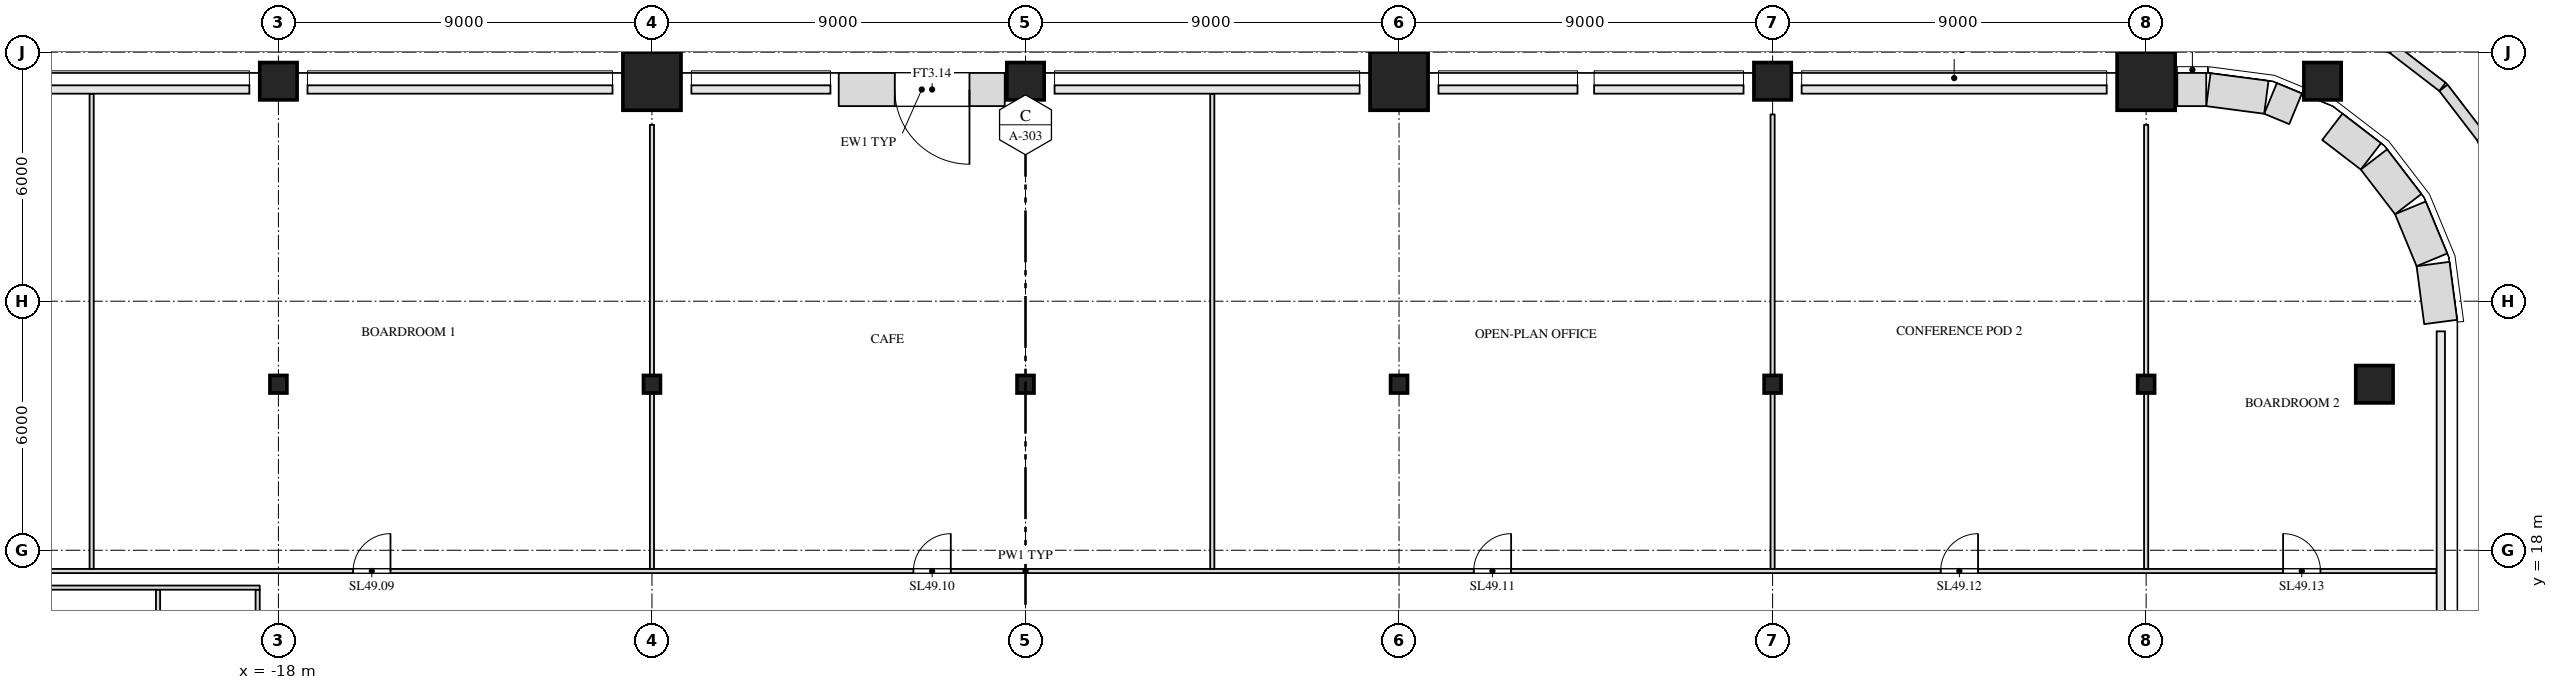
"""IFC4 building model, lengths in metres.
Left out: names, types, materials, properties, quantities, classifications, styles, units other than length and angle.
Written with IfcOpenShell. Run it as: python <this file> out.ifc"""

import sys

from ifc_helpers import new_model, si_unit, direction, frame, frame_2d, origin, origin_2d, place, context, subcontext, project, spatial, rectangle, i_section, extrude, clip, halfspace, element, fill, save


model = new_model("IFC4")
c1 = context("Model", 3, precision=1e-05, world=origin(), true_north=direction((0.0, 1.0)))
c2 = subcontext(c1, "Body", "Model", "MODEL_VIEW")
j1 = project(units=[si_unit("LENGTHUNIT", "METRE"), si_unit("PLANEANGLEUNIT", "RADIAN")], contexts=[c1])
p1 = place(None, origin())
s1 = spatial("IfcSite", under=j1, at=p1, CompositionType="ELEMENT")
p2 = place(p1, origin())
s2 = spatial("IfcBuilding", under=s1, at=p2, CompositionType="ELEMENT")
p3 = place(p2, frame((0.0, 0.0, 212.5)))
s3 = spatial("IfcBuildingStorey", under=s2, at=p3, CompositionType="ELEMENT", Elevation=212.5)
for number, where, z_axis, x_axis in (
    (1, (-18.0, 22.0, 0.0), (0.0, 0.0, 1.0), (1.0, 0.0, 0.0)),
    (2, (-9.0, 22.0, 0.0), (0.0, 0.0, 1.0), (1.0, 0.0, 0.0)),
    (3, (0.0, 22.0, 0.0), (0.0, 0.0, 1.0), (1.0, 0.0, 0.0)),
    (4, (9.0, 22.0, 0.0), (0.0, 0.0, 1.0), (1.0, 0.0, 0.0)),
    (5, (18.0, 22.0, 0.0), (0.0, 0.0, 1.0), (1.0, 0.0, 0.0)),
    (6, (27.0, 22.0, 0.0), (0.0, 0.0, 1.0), (1.0, 0.0, 0.0)),
):
    element("IfcColumn", number, at=place(p3, frame(where, z_axis=z_axis, x_axis=x_axis)), inside=s3, PredefinedType="COLUMN", context=c2, shape_type="SweptSolid", body=[
        extrude(i_section(OverallWidth=0.409, OverallDepth=0.424, WebThickness=0.033, FlangeThickness=0.052, at=origin_2d()), origin(), (0.0, 0.0, 1.0), 4.0),
    ])
p4 = place(p3, frame((32.5, 22.0, 0.0), z_axis=(0.0, 0.0, 1.0), x_axis=(1.0, 0.0, 0.0)))
e7 = element("IfcColumn", 7, at=p4, inside=s3, PredefinedType="COLUMN", context=c2, shape_type="SweptSolid", body=[
    extrude(rectangle(XDim=0.9, YDim=0.9, at=origin_2d()), origin(), (0.0, 0.0, 1.0), 4.0),
])
p5 = place(p3, frame((-18.0, 29.0, 0.0), z_axis=(0.0, 0.242535625036, 0.970142500145), x_axis=(-1.0, 0.0, 0.0)))
e8 = element("IfcColumn", 8, at=p5, inside=s3, PredefinedType="COLUMN", context=c2, shape_type="Clipping", body=[
    clip(extrude(rectangle(XDim=0.9, YDim=0.9, at=origin_2d()), origin(), (0.0, 0.0, 1.0), 4.123), halfspace(frame((0.0, 0.0, 0.113)), True)),
])
p6 = place(p3, frame((-9.0, 29.0, 0.0), z_axis=(0.0, 0.242535625036, 0.970142500145), x_axis=(-1.0, 0.0, 0.0)))
e9 = element("IfcColumn", 9, at=p6, inside=s3, PredefinedType="COLUMN", context=c2, shape_type="Clipping", body=[
    clip(extrude(rectangle(XDim=1.4, YDim=1.4, at=origin_2d()), origin(), (0.0, 0.0, 1.0), 4.123), halfspace(frame((0.0, 0.0, 0.175)), True)),
])
p7 = place(p3, frame((0.0, 29.0, 0.0), z_axis=(0.0, 0.242535625036, 0.970142500145), x_axis=(-1.0, 0.0, 0.0)))
e10 = element("IfcColumn", 10, at=p7, inside=s3, PredefinedType="COLUMN", context=c2, shape_type="Clipping", body=[
    clip(extrude(rectangle(XDim=0.9, YDim=0.9, at=origin_2d()), origin(), (0.0, 0.0, 1.0), 4.123), halfspace(frame((0.0, 0.0, 0.113)), True)),
])
p8 = place(p3, frame((9.0, 29.0, 0.0), z_axis=(0.0, 0.242535625036, 0.970142500145), x_axis=(-1.0, 0.0, 0.0)))
e11 = element("IfcColumn", 11, at=p8, inside=s3, PredefinedType="COLUMN", context=c2, shape_type="Clipping", body=[
    clip(extrude(rectangle(XDim=1.4, YDim=1.4, at=origin_2d()), origin(), (0.0, 0.0, 1.0), 4.123), halfspace(frame((0.0, 0.0, 0.175)), True)),
])
p9 = place(p3, frame((18.0, 29.0, 0.0), z_axis=(0.0, 0.242535625036, 0.970142500145), x_axis=(-1.0, 0.0, 0.0)))
e12 = element("IfcColumn", 12, at=p9, inside=s3, PredefinedType="COLUMN", context=c2, shape_type="Clipping", body=[
    clip(extrude(rectangle(XDim=0.9, YDim=0.9, at=origin_2d()), origin(), (0.0, 0.0, 1.0), 4.123), halfspace(frame((0.0, 0.0, 0.113)), True)),
])
p10 = place(p3, frame((27.0, 29.0, 0.0), z_axis=(0.0, 0.242535625036, 0.970142500145), x_axis=(-1.0, 0.0, 0.0)))
e13 = element("IfcColumn", 13, at=p10, inside=s3, PredefinedType="COLUMN", context=c2, shape_type="Clipping", body=[
    clip(extrude(rectangle(XDim=1.4, YDim=1.4, at=origin_2d()), origin(), (0.0, 0.0, 1.0), 4.123), halfspace(frame((0.0, 0.0, 0.175)), True)),
])
p11 = place(p3, frame((31.25, 29.0, 0.0), z_axis=(0.0, 0.242535625036, 0.970142500145), x_axis=(-1.0, 0.0, 0.0)))
e14 = element("IfcColumn", 14, at=p11, inside=s3, PredefinedType="COLUMN", context=c2, shape_type="Clipping", body=[
    clip(extrude(rectangle(XDim=0.9, YDim=0.9, at=origin_2d()), origin(), (0.0, 0.0, 1.0), 4.123), halfspace(frame((0.0, 0.0, 0.113)), True)),
])
p12 = place(p3, frame((-18.5, 10.55, 0.0), z_axis=(0.0, 0.0, 1.0), x_axis=(0.0, 1.0, 0.0)))
e15 = element("IfcWall", 15, at=p12, inside=s3, PredefinedType="PARTITIONING", context=c2, shape_type="SweptSolid", body=[
    extrude(rectangle(XDim=6.5, YDim=0.1, at=frame_2d((3.25, 0.0))), origin(), (0.0, 0.0, 1.0), 3.65),
])
p13 = place(p3, frame((-20.9, 12.95, 0.0), z_axis=(0.0, 0.0, 1.0), x_axis=(0.0, 1.0, 0.0)))
e16 = element("IfcWall", 16, at=p13, inside=s3, PredefinedType="PARTITIONING", context=c2, shape_type="SweptSolid", body=[
    extrude(rectangle(XDim=4.1, YDim=0.1, at=frame_2d((2.05, 0.0))), origin(), (0.0, 0.0, 1.0), 3.65),
])
p14 = place(p3, frame((-26.55, 17.1, 0.0), z_axis=(0.0, 0.0, 1.0), x_axis=(1.0, 0.0, 0.0)))
e17 = element("IfcWall", 17, at=p14, inside=s3, PredefinedType="PARTITIONING", context=c2, shape_type="SweptSolid", body=[
    extrude(rectangle(XDim=8.1, YDim=0.1, at=frame_2d((4.05, 0.0))), origin(), (0.0, 0.0, 1.0), 3.65),
])
p15 = place(p3, frame((-33.996, 17.5, 0.0), z_axis=(0.0, 0.0, 1.0), x_axis=(1.0, 0.0, 0.0)))
e18 = element("IfcWall", 18, at=p15, inside=s3, PredefinedType="PARTITIONING", context=c2, shape_type="SweptSolid", body=[
    extrude(rectangle(XDim=67.992, YDim=0.1, at=frame_2d((33.996, 0.0))), origin(), (0.0, 0.0, 1.0), 3.65),
])
p16 = place(p15, frame((5.046, 0.0, 0.0)))
e19 = element("IfcOpeningElement", 19, at=p16, cuts=e18, PredefinedType="OPENING", context=c2, shape_type="SweptSolid", body=[
    extrude(rectangle(XDim=0.9, YDim=2.1, at=frame_2d((0.45, 1.05))), frame((0.0, 0.062, 0.0), z_axis=(0.0, -1.0, 0.0), x_axis=(1.0, 0.0, 0.0)), (0.0, 0.0, 1.0), 0.124),
])
p17 = place(p15, frame((17.796, 0.0, 0.0)))
e20 = element("IfcOpeningElement", 20, at=p17, cuts=e18, PredefinedType="OPENING", context=c2, shape_type="SweptSolid", body=[
    extrude(rectangle(XDim=0.9, YDim=2.1, at=frame_2d((0.45, 1.05))), frame((0.0, 0.062, 0.0), z_axis=(0.0, -1.0, 0.0), x_axis=(1.0, 0.0, 0.0)), (0.0, 0.0, 1.0), 0.124),
])
p18 = place(p15, frame((31.296, 0.0, 0.0)))
e21 = element("IfcOpeningElement", 21, at=p18, cuts=e18, PredefinedType="OPENING", context=c2, shape_type="SweptSolid", body=[
    extrude(rectangle(XDim=0.9, YDim=2.1, at=frame_2d((0.45, 1.05))), frame((0.0, 0.062, 0.0), z_axis=(0.0, -1.0, 0.0), x_axis=(1.0, 0.0, 0.0)), (0.0, 0.0, 1.0), 0.124),
])
p19 = place(p15, frame((44.796, 0.0, 0.0)))
e22 = element("IfcOpeningElement", 22, at=p19, cuts=e18, PredefinedType="OPENING", context=c2, shape_type="SweptSolid", body=[
    extrude(rectangle(XDim=0.9, YDim=2.1, at=frame_2d((0.45, 1.05))), frame((0.0, 0.062, 0.0), z_axis=(0.0, -1.0, 0.0), x_axis=(1.0, 0.0, 0.0)), (0.0, 0.0, 1.0), 0.124),
])
p20 = place(p15, frame((56.046, 0.0, 0.0)))
e23 = element("IfcOpeningElement", 23, at=p20, cuts=e18, PredefinedType="OPENING", context=c2, shape_type="SweptSolid", body=[
    extrude(rectangle(XDim=0.9, YDim=2.1, at=frame_2d((0.45, 1.05))), frame((0.0, 0.062, 0.0), z_axis=(0.0, -1.0, 0.0), x_axis=(1.0, 0.0, 0.0)), (0.0, 0.0, 1.0), 0.124),
])
p21 = place(p15, frame((64.296, 0.0, 0.0)))
e24 = element("IfcOpeningElement", 24, at=p21, cuts=e18, PredefinedType="OPENING", context=c2, shape_type="SweptSolid", body=[
    extrude(rectangle(XDim=0.9, YDim=2.1, at=frame_2d((0.45, 1.05))), frame((0.0, 0.062, 0.0), z_axis=(0.0, -1.0, 0.0), x_axis=(1.0, 0.0, 0.0)), (0.0, 0.0, 1.0), 0.124),
])
p22 = place(p3, frame((-22.5, 17.55, 0.0), z_axis=(0.0, 0.0, 1.0), x_axis=(0.0, 1.0, 0.0)))
e25 = element("IfcWall", 25, at=p22, inside=s3, PredefinedType="PARTITIONING", context=c2, shape_type="SweptSolid", body=[
    extrude(rectangle(XDim=11.446, YDim=0.1, at=frame_2d((5.723, 0.0))), origin(), (0.0, 0.0, 1.0), 3.65),
])
p23 = place(p3, frame((-9.0, 17.55, 0.0), z_axis=(0.0, 0.0, 1.0), x_axis=(0.0, 1.0, 0.0)))
e26 = element("IfcWall", 26, at=p23, inside=s3, PredefinedType="PARTITIONING", context=c2, shape_type="SweptSolid", body=[
    extrude(rectangle(XDim=4.238, YDim=0.1, at=frame_2d((2.119, 0.0))), origin(), (0.0, 0.0, 1.0), 3.043),
])
p24 = place(p3, frame((-9.0, 22.212, 0.0), z_axis=(0.0, 0.0, 1.0), x_axis=(0.0, 1.0, 0.0)))
e27 = element("IfcWall", 27, at=p24, inside=s3, PredefinedType="PARTITIONING", context=c2, shape_type="SweptSolid", body=[
    extrude(rectangle(XDim=6.038, YDim=0.1, at=frame_2d((3.019, 0.0))), origin(), (0.0, 0.0, 1.0), 3.65),
])
p25 = place(p3, frame((4.5, 17.55, 0.0), z_axis=(0.0, 0.0, 1.0), x_axis=(0.0, 1.0, 0.0)))
e28 = element("IfcWall", 28, at=p25, inside=s3, PredefinedType="PARTITIONING", context=c2, shape_type="SweptSolid", body=[
    extrude(rectangle(XDim=11.446, YDim=0.1, at=frame_2d((5.723, 0.0))), origin(), (0.0, 0.0, 1.0), 3.65),
])
p26 = place(p3, frame((18.0, 17.55, 0.0), z_axis=(0.0, 0.0, 1.0), x_axis=(0.0, 1.0, 0.0)))
e29 = element("IfcWall", 29, at=p26, inside=s3, PredefinedType="PARTITIONING", context=c2, shape_type="SweptSolid", body=[
    extrude(rectangle(XDim=4.238, YDim=0.1, at=frame_2d((2.119, 0.0))), origin(), (0.0, 0.0, 1.0), 3.043),
])
p27 = place(p3, frame((18.0, 22.212, 0.0), z_axis=(0.0, 0.0, 1.0), x_axis=(0.0, 1.0, 0.0)))
e30 = element("IfcWall", 30, at=p27, inside=s3, PredefinedType="PARTITIONING", context=c2, shape_type="SweptSolid", body=[
    extrude(rectangle(XDim=6.288, YDim=0.1, at=frame_2d((3.144, 0.0))), origin(), (0.0, 0.0, 1.0), 3.65),
])
p28 = place(p3, frame((27.0, 17.55, 0.0), z_axis=(0.0, 0.0, 1.0), x_axis=(0.0, 1.0, 0.0)))
e31 = element("IfcWall", 31, at=p28, inside=s3, PredefinedType="PARTITIONING", context=c2, shape_type="SweptSolid", body=[
    extrude(rectangle(XDim=4.238, YDim=0.1, at=frame_2d((2.119, 0.0))), origin(), (0.0, 0.0, 1.0), 3.043),
])
p29 = place(p3, frame((27.0, 22.212, 0.0), z_axis=(0.0, 0.0, 1.0), x_axis=(0.0, 1.0, 0.0)))
e32 = element("IfcWall", 32, at=p29, inside=s3, PredefinedType="PARTITIONING", context=c2, shape_type="SweptSolid", body=[
    extrude(rectangle(XDim=6.038, YDim=0.1, at=frame_2d((3.019, 0.0))), origin(), (0.0, 0.0, 1.0), 3.65),
])
p30 = place(p3, frame((34.097, 23.5, 0.0), z_axis=(0.0, 0.0, 1.0), x_axis=(-0.130517283865, 0.99144603414, 0.0)))
e33 = element("IfcWall", 33, at=p30, inside=s3, PredefinedType="SOLIDWALL", context=c2, shape_type="SweptSolid", body=[
    extrude(rectangle(XDim=1.408, YDim=0.8, at=frame_2d((0.704, 0.0))), origin(), (0.0, 0.0, 1.0), 3.65),
])
p31 = place(p3, frame((33.886, 24.997, 0.0), z_axis=(0.0, 0.0, 1.0), x_axis=(-0.38276009378, 0.923847774587, 0.0)))
e34 = element("IfcWall", 34, at=p31, inside=s3, PredefinedType="SOLIDWALL", context=c2, shape_type="SweptSolid", body=[
    extrude(rectangle(XDim=1.355, YDim=0.8, at=frame_2d((0.678, 0.0))), origin(), (0.0, 0.0, 1.0), 3.65),
])
p32 = place(p3, frame((33.315, 26.34, 0.0), z_axis=(0.0, 0.0, 1.0), x_axis=(-0.608866226366, 0.793272915452, 0.0)))
e35 = element("IfcWall", 35, at=p32, inside=s3, PredefinedType="SOLIDWALL", context=c2, shape_type="SweptSolid", body=[
    extrude(rectangle(XDim=1.356, YDim=0.8, at=frame_2d((0.678, 0.0))), origin(), (0.0, 0.0, 1.0), 3.65),
])
p33 = place(p3, frame((32.416, 27.489, 0.0), z_axis=(0.0, 0.0, 1.0), x_axis=(-0.793321035123, 0.608803527611, 0.0)))
e36 = element("IfcWall", 36, at=p33, inside=s3, PredefinedType="SOLIDWALL", context=c2, shape_type="SweptSolid", body=[
    extrude(rectangle(XDim=1.171, YDim=0.8, at=frame_2d((0.585, 0.0))), origin(), (0.0, 0.0, 1.0), 3.65),
])
p34 = place(p3, frame((30.601, 28.636, 0.0), z_axis=(0.0, 0.0, 1.0), x_axis=(-0.923816299568, 0.382836054536, 0.0)))
e37 = element("IfcWall", 37, at=p34, inside=s3, PredefinedType="SOLIDWALL", context=c2, shape_type="SweptSolid", body=[
    extrude(rectangle(XDim=0.653, YDim=0.8, at=frame_2d((0.327, 0.0))), origin(), (0.0, 0.0, 1.0), 3.65),
])
p35 = place(p3, frame((29.896, 28.913, 0.0), z_axis=(0.0, 0.0, 1.0), x_axis=(-0.99144603414, 0.130517283865, 0.0)))
e38 = element("IfcWall", 38, at=p35, inside=s3, PredefinedType="SOLIDWALL", context=c2, shape_type="SweptSolid", body=[
    extrude(rectangle(XDim=1.408, YDim=0.8, at=frame_2d((0.704, 0.0))), origin(), (0.0, 0.0, 1.0), 3.65),
])
p36 = place(p3, frame((28.448, 29.1, 0.0), z_axis=(0.0, 0.0, 1.0), x_axis=(-1.0, 0.0, 0.0)))
e39 = element("IfcWall", 39, at=p36, inside=s3, PredefinedType="SOLIDWALL", context=c2, shape_type="SweptSolid", body=[
    extrude(rectangle(XDim=0.698, YDim=0.8, at=frame_2d((0.349, 0.0))), origin(), (0.0, 0.0, 1.0), 3.65),
])
p37 = place(p3, frame((-0.5, 29.1, 0.0), z_axis=(0.0, 0.0, 1.0), x_axis=(-1.0, 0.0, 0.0)))
e40 = element("IfcWall", 40, at=p37, inside=s3, PredefinedType="SOLIDWALL", context=c2, shape_type="SweptSolid", body=[
    extrude(rectangle(XDim=4.0, YDim=0.8, at=frame_2d((2.0, 0.0))), origin(), (0.0, 0.0, 1.0), 3.65),
])
p38 = place(p37, frame((0.85, 0.0, 0.0)))
e41 = element("IfcOpeningElement", 41, at=p38, cuts=e40, PredefinedType="OPENING", context=c2, shape_type="SweptSolid", body=[
    extrude(rectangle(XDim=1.8, YDim=2.4, at=frame_2d((0.9, 1.2))), frame((0.0, 0.412, 0.0), z_axis=(0.0, -1.0, 0.0), x_axis=(1.0, 0.0, 0.0)), (0.0, 0.0, 1.0), 0.824),
])
for number, where, z_axis, x_axis in (
    (42, (35.667, 26.535, 0.0), (0.0, 0.0, 1.0), (-0.383, 0.924, 0.0)),
    (43, (35.077, 27.95, 0.0), (0.0, 0.0, 1.0), (-0.609, 0.793, 0.0)),
    (44, (34.14, 29.164, 0.0), (0.0, 0.0, 1.0), (-0.793, 0.609, 0.0)),
    (45, (32.922, 30.093, 0.0), (0.0, 0.0, 1.0), (-0.924, 0.383, 0.0)),
):
    element("IfcWall", number, at=place(p3, frame(where, z_axis=z_axis, x_axis=x_axis)), inside=s3, PredefinedType="PARAPET", context=c2, shape_type="SweptSolid", body=[
        extrude(rectangle(XDim=1.5, YDim=0.25, at=frame_2d((0.75, 0.0))), origin(), (0.0, 0.0, 1.0), 1.1),
    ])
p39 = place(p17, origin())
e46 = element("IfcDoor", 46, at=p39, inside=s3, OperationType="SINGLE_SWING_RIGHT", PredefinedType="DOOR", context=c2, shape_type="SweptSolid", body=[
    extrude(rectangle(XDim=0.9, YDim=2.1, at=frame_2d((0.45, 1.05))), frame((0.0, 0.025, 0.0), z_axis=(0.0, -1.0, 0.0), x_axis=(1.0, 0.0, 0.0)), (0.0, 0.0, 1.0), 0.05),
])
fill(e20, e46)
p40 = place(p18, origin())
e47 = element("IfcDoor", 47, at=p40, inside=s3, OperationType="SINGLE_SWING_RIGHT", PredefinedType="DOOR", context=c2, shape_type="SweptSolid", body=[
    extrude(rectangle(XDim=0.9, YDim=2.1, at=frame_2d((0.45, 1.05))), frame((0.0, 0.025, 0.0), z_axis=(0.0, -1.0, 0.0), x_axis=(1.0, 0.0, 0.0)), (0.0, 0.0, 1.0), 0.05),
])
fill(e21, e47)
p41 = place(p19, origin())
e48 = element("IfcDoor", 48, at=p41, inside=s3, OperationType="SINGLE_SWING_RIGHT", PredefinedType="DOOR", context=c2, shape_type="SweptSolid", body=[
    extrude(rectangle(XDim=0.9, YDim=2.1, at=frame_2d((0.45, 1.05))), frame((0.0, 0.025, 0.0), z_axis=(0.0, -1.0, 0.0), x_axis=(1.0, 0.0, 0.0)), (0.0, 0.0, 1.0), 0.05),
])
fill(e22, e48)
p42 = place(p20, origin())
e49 = element("IfcDoor", 49, at=p42, inside=s3, OperationType="SINGLE_SWING_RIGHT", PredefinedType="DOOR", context=c2, shape_type="SweptSolid", body=[
    extrude(rectangle(XDim=0.9, YDim=2.1, at=frame_2d((0.45, 1.05))), frame((0.0, 0.025, 0.0), z_axis=(0.0, -1.0, 0.0), x_axis=(1.0, 0.0, 0.0)), (0.0, 0.0, 1.0), 0.05),
])
fill(e23, e49)
p43 = place(p21, origin())
e50 = element("IfcDoor", 50, at=p43, inside=s3, OperationType="SINGLE_SWING_LEFT", PredefinedType="DOOR", context=c2, shape_type="SweptSolid", body=[
    extrude(rectangle(XDim=0.9, YDim=2.1, at=frame_2d((0.45, 1.05))), frame((0.0, 0.025, 0.0), z_axis=(0.0, -1.0, 0.0), x_axis=(1.0, 0.0, 0.0)), (0.0, 0.0, 1.0), 0.05),
])
fill(e24, e50)
p44 = place(p38, origin())
e51 = element("IfcDoor", 51, at=p44, inside=s3, OperationType="DOUBLE_DOOR_SINGLE_SWING", PredefinedType="DOOR", context=c2, shape_type="SweptSolid", body=[
    extrude(rectangle(XDim=1.8, YDim=2.4, at=frame_2d((0.9, 1.2))), frame((0.0, 0.025, 0.0), z_axis=(0.0, -1.0, 0.0), x_axis=(1.0, 0.0, 0.0)), (0.0, 0.0, 1.0), 0.05),
])
fill(e41, e51)
save(model, sys.argv[1])
